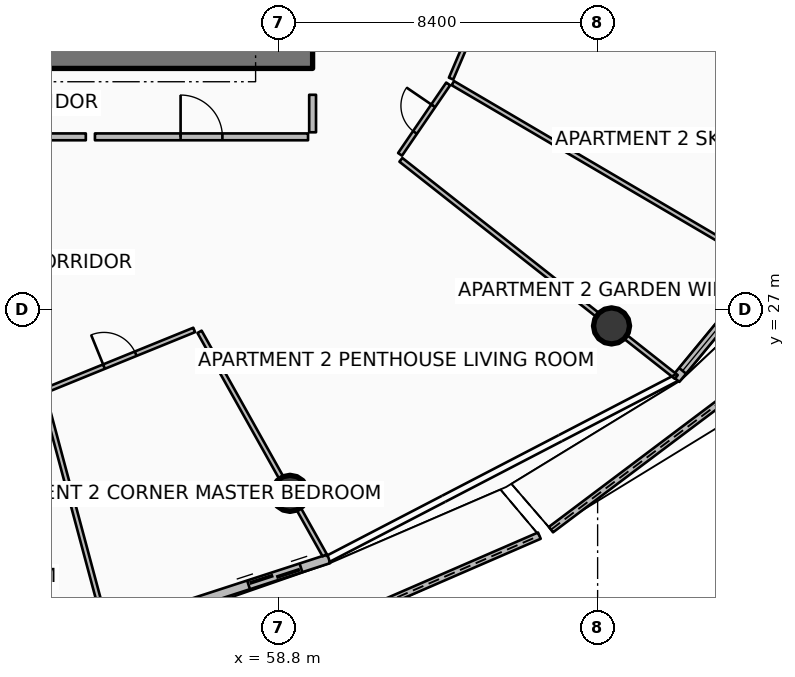
"""IFC4 building model, lengths in metres.
Left out: names, types, materials, properties, quantities, classifications, styles, units other than length and angle.
Written with IfcOpenShell. Run it as: python <this file> out.ifc"""

import sys

from ifc_helpers import new_model, si_unit, direction, frame, frame_2d, origin, origin_2d, place, context, subcontext, project, spatial, polyline, rectangle, circle, outline, extrude, element, fill, save


model = new_model("IFC4")
c1 = context("Model", 3, precision=1e-05, world=origin(), true_north=direction((0.0, 1.0)))
c2 = subcontext(c1, "Body", "Model", "MODEL_VIEW")
j1 = project(units=[si_unit("LENGTHUNIT", "METRE"), si_unit("PLANEANGLEUNIT", "RADIAN")], contexts=[c1])
p1 = place(None, origin())
s1 = spatial("IfcSite", under=j1, at=p1, CompositionType="ELEMENT")
p2 = place(p1, origin())
s2 = spatial("IfcBuilding", under=s1, at=p2, CompositionType="ELEMENT")
p3 = place(p2, frame((0.0, 0.0, 240.55)))
s3 = spatial("IfcBuildingStorey", under=s2, at=p3, CompositionType="ELEMENT", Elevation=240.55)
p4 = place(p3, frame((49.95, 33.675, 0.0), z_axis=(0.0, 0.0, 1.0), x_axis=(1.0, 0.0, 0.0)))
e1 = element("IfcWall", 1, at=p4, inside=s3, PredefinedType="SHEAR", context=c2, shape_type="SweptSolid", body=[
    extrude(rectangle(XDim=9.75, YDim=0.65, at=frame_2d((4.875, 0.0))), origin(), (0.0, 0.0, 1.0), 3.85),
])
for number, where, z_axis, x_axis in (
    (2, (59.105, 22.17, 0.0), (0.0, 0.0, 1.0), (1.0, 0.0, 0.0)),
    (3, (67.566, 26.575, 0.0), (0.0, 0.0, 1.0), (1.0, 0.0, 0.0)),
):
    element("IfcColumn", number, at=place(p3, frame(where, z_axis=z_axis, x_axis=x_axis)), inside=s3, PredefinedType="COLUMN", context=c2, shape_type="SweptSolid", body=[
        extrude(circle(Radius=0.475, at=origin_2d()), origin(), (0.0, 0.0, 1.0), 3.59),
    ])
p5 = place(p3, frame((56.257, 16.974, 0.0), z_axis=(0.0, 0.0, 1.0), x_axis=(0.917372888721, 0.398028872119, 0.0)))
e4 = element("IfcWall", 4, at=p5, inside=s3, PredefinedType="PARAPET", context=c2, shape_type="SweptSolid", body=[
    extrude(outline(polyline([(0.0, 0.0), (10.258, 0.0), (10.257, 1.12), (5.129, 1.182), (0.0, 1.348), (0.0, 0.0)])), frame((0.0, 0.09, 0.0), z_axis=(0.0, -1.0, 0.0), x_axis=(1.0, 0.0, 0.0)), (0.0, 0.0, 1.0), 0.18),
])
p6 = place(p3, frame((65.972, 21.216, 0.0), z_axis=(0.0, 0.0, 1.0), x_axis=(0.799146815098, 0.601135898046, 0.0)))
e5 = element("IfcWall", 5, at=p6, inside=s3, PredefinedType="PARAPET", context=c2, shape_type="SweptSolid", body=[
    extrude(outline(polyline([(0.0, 0.0), (11.411, 0.0), (11.411, 1.348), (5.706, 1.182), (0.0, 1.12), (0.0, 0.0)])), frame((0.0, 0.09, 0.0), z_axis=(0.0, -1.0, 0.0), x_axis=(1.0, 0.0, 0.0)), (0.0, 0.0, 1.0), 0.18),
])
p7 = place(p3, frame((50.858, 17.436, 0.0), z_axis=(0.0, 0.0, 1.0), x_axis=(0.951055974609, 0.309018661507, 0.0)))
e6 = element("IfcWall", 6, at=p7, inside=s3, PredefinedType="SOLIDWALL", context=c2, shape_type="SweptSolid", body=[
    extrude(rectangle(XDim=9.745, YDim=0.24, at=frame_2d((4.873, 0.0))), origin(), (0.0, 0.0, 1.0), 2.54),
])
p8 = place(p7, frame((7.525, 0.0, 0.0)))
e7 = element("IfcOpeningElement", 7, at=p8, cuts=e6, PredefinedType="OPENING", context=c2, shape_type="SweptSolid", body=[
    extrude(rectangle(XDim=1.45, YDim=2.15, at=frame_2d((0.725, 1.075))), frame((0.0, 0.13, 0.0), z_axis=(0.0, -1.0, 0.0), x_axis=(1.0, 0.0, 0.0)), (0.0, 0.0, 1.0), 0.26),
])
p9 = place(p7, frame((0.28, 0.0, 0.65)))
e8 = element("IfcOpeningElement", 8, at=p9, cuts=e6, PredefinedType="OPENING", context=c2, shape_type="SweptSolid", body=[
    extrude(rectangle(XDim=1.6, YDim=1.5, at=frame_2d((0.8, 0.75))), frame((0.0, 0.13, 0.0), z_axis=(0.0, -1.0, 0.0), x_axis=(1.0, 0.0, 0.0)), (0.0, 0.0, 1.0), 0.26),
])
p10 = place(p3, frame((69.258, 25.178, 0.0), z_axis=(0.0, 0.0, 1.0), x_axis=(0.636680093065, 0.771128043255, 0.0)))
e9 = element("IfcWall", 9, at=p10, inside=s3, PredefinedType="SOLIDWALL", context=c2, shape_type="SweptSolid", body=[
    extrude(rectangle(XDim=11.438, YDim=0.24, at=frame_2d((5.719, 0.0))), origin(), (0.0, 0.0, 1.0), 2.54),
])
p11 = place(p10, frame((9.218, 0.0, 0.0)))
e10 = element("IfcOpeningElement", 10, at=p11, cuts=e9, PredefinedType="OPENING", context=c2, shape_type="SweptSolid", body=[
    extrude(rectangle(XDim=1.45, YDim=2.15, at=frame_2d((0.725, 1.075))), frame((0.0, 0.13, 0.0), z_axis=(0.0, -1.0, 0.0), x_axis=(1.0, 0.0, 0.0)), (0.0, 0.0, 1.0), 0.26),
])
p12 = place(p10, frame((0.28, 0.0, 0.65)))
e11 = element("IfcOpeningElement", 11, at=p12, cuts=e9, PredefinedType="OPENING", context=c2, shape_type="SweptSolid", body=[
    extrude(rectangle(XDim=1.6, YDim=1.5, at=frame_2d((0.8, 0.75))), frame((0.0, 0.13, 0.0), z_axis=(0.0, -1.0, 0.0), x_axis=(1.0, 0.0, 0.0)), (0.0, 0.0, 1.0), 0.26),
])
p13 = place(p3, frame((53.972, 31.55, 0.0), z_axis=(0.0, 0.0, 1.0), x_axis=(1.0, 0.0, 0.0)))
e12 = element("IfcWall", 12, at=p13, inside=s3, PredefinedType="PARTITIONING", context=c2, shape_type="SweptSolid", body=[
    extrude(rectangle(XDim=5.608, YDim=0.18, at=frame_2d((2.804, 0.0))), origin(), (0.0, 0.0, 1.0), 2.957),
])
p14 = place(p13, frame((2.254, 0.0, 0.0)))
e13 = element("IfcOpeningElement", 13, at=p14, cuts=e12, PredefinedType="OPENING", context=c2, shape_type="SweptSolid", body=[
    extrude(rectangle(XDim=1.1, YDim=2.1, at=frame_2d((0.55, 1.05))), frame((0.0, 0.1, 0.0), z_axis=(0.0, -1.0, 0.0), x_axis=(1.0, 0.0, 0.0)), (0.0, 0.0, 1.0), 0.2),
])
p15 = place(p3, frame((59.7, 31.67, 0.0), z_axis=(0.0, 0.0, 1.0), x_axis=(0.0, 1.0, 0.0)))
e14 = element("IfcWall", 14, at=p15, inside=s3, PredefinedType="PARTITIONING", context=c2, shape_type="SweptSolid", body=[
    extrude(rectangle(XDim=0.987, YDim=0.18, at=frame_2d((0.493, 0.0))), origin(), (0.0, 0.0, 1.0), 2.957),
])
p16 = place(p3, frame((49.357, 31.55, 0.0), z_axis=(0.0, 0.0, 1.0), x_axis=(1.0, 0.0, 0.0)))
e15 = element("IfcWall", 15, at=p16, inside=s3, PredefinedType="PARTITIONING", context=c2, shape_type="SweptSolid", body=[
    extrude(rectangle(XDim=4.376, YDim=0.18, at=frame_2d((2.188, 0.0))), origin(), (0.0, 0.0, 1.0), 2.957),
])
p17 = place(p3, frame((56.725, 26.42, 0.0), z_axis=(0.0, 0.0, 1.0), x_axis=(0.488624332812, -0.872494275846, 0.0)))
e16 = element("IfcWall", 16, at=p17, inside=s3, PredefinedType="PARTITIONING", context=c2, shape_type="SweptSolid", body=[
    extrude(rectangle(XDim=6.738, YDim=0.125, at=frame_2d((3.369, 0.0))), origin(), (0.0, 0.0, 1.0), 2.957),
])
p18 = place(p3, frame((52.621, 24.762, 0.0), z_axis=(0.0, 0.0, 1.0), x_axis=(0.258970884365, -0.96588512829, 0.0)))
e17 = element("IfcWall", 17, at=p18, inside=s3, PredefinedType="PARTITIONING", context=c2, shape_type="SweptSolid", body=[
    extrude(rectangle(XDim=6.306, YDim=0.125, at=frame_2d((3.153, 0.0))), origin(), (0.0, 0.0, 1.0), 3.03),
])
p19 = place(p3, frame((52.672, 24.879, 0.0), z_axis=(0.0, 0.0, 1.0), x_axis=(0.926344303187, 0.376677888857, 0.0)))
e18 = element("IfcWall", 18, at=p19, inside=s3, PredefinedType="PARTITIONING", context=c2, shape_type="SweptSolid", body=[
    extrude(rectangle(XDim=4.223, YDim=0.125, at=frame_2d((2.111, 0.0))), origin(), (0.0, 0.0, 1.0), 2.957),
])
p20 = place(p19, frame((1.661, 0.0, 0.0)))
e19 = element("IfcOpeningElement", 19, at=p20, cuts=e18, PredefinedType="OPENING", context=c2, shape_type="SweptSolid", body=[
    extrude(rectangle(XDim=0.9, YDim=2.08, at=frame_2d((0.45, 1.04))), frame((0.0, 0.073, 0.0), z_axis=(0.0, -1.0, 0.0), x_axis=(1.0, 0.0, 0.0)), (0.0, 0.0, 1.0), 0.145),
])
p21 = place(p3, frame((62.023, 30.945, 0.0), z_axis=(0.0, 0.0, 1.0), x_axis=(0.785322102606, -0.619087388952, 0.0)))
e20 = element("IfcWall", 20, at=p21, inside=s3, PredefinedType="PARTITIONING", context=c2, shape_type="SweptSolid", body=[
    extrude(rectangle(XDim=9.228, YDim=0.125, at=frame_2d((4.614, 0.0))), origin(), (0.0, 0.0, 1.0), 2.957),
])
p22 = place(p3, frame((63.39, 32.963, 0.0), z_axis=(0.0, 0.0, 1.0), x_axis=(0.862331921897, -0.506343417532, 0.0)))
e21 = element("IfcWall", 21, at=p22, inside=s3, PredefinedType="PARTITIONING", context=c2, shape_type="SweptSolid", body=[
    extrude(rectangle(XDim=9.478, YDim=0.125, at=frame_2d((4.739, 0.0))), origin(), (0.0, 0.0, 1.0), 3.03),
])
p23 = place(p3, frame((62.001, 31.089, 0.0), z_axis=(0.0, 0.0, 1.0), x_axis=(0.564052095913, 0.825739204044, 0.0)))
e22 = element("IfcWall", 22, at=p23, inside=s3, PredefinedType="PARTITIONING", context=c2, shape_type="SweptSolid", body=[
    extrude(rectangle(XDim=2.245, YDim=0.125, at=frame_2d((1.122, 0.0))), origin(), (0.0, 0.0, 1.0), 2.957),
])
p24 = place(p23, frame((0.698, 0.0, 0.0)))
e23 = element("IfcOpeningElement", 23, at=p24, cuts=e22, PredefinedType="OPENING", context=c2, shape_type="SweptSolid", body=[
    extrude(rectangle(XDim=0.85, YDim=2.06, at=frame_2d((0.425, 1.03))), frame((0.0, 0.073, 0.0), z_axis=(0.0, -1.0, 0.0), x_axis=(1.0, 0.0, 0.0)), (0.0, 0.0, 1.0), 0.145),
])
p25 = place(p3, frame((63.344, 33.083, 0.0), z_axis=(0.0, 0.0, 1.0), x_axis=(0.392064212371, 0.919937852998, 0.0)))
e24 = element("IfcWall", 24, at=p25, inside=s3, PredefinedType="PARTITIONING", context=c2, shape_type="SweptSolid", body=[
    extrude(rectangle(XDim=4.354, YDim=0.125, at=frame_2d((2.177, 0.0))), origin(), (0.0, 0.0, 1.0), 2.957),
])
p26 = place(p25, frame((1.727, 0.0, 0.0)))
e25 = element("IfcOpeningElement", 25, at=p26, cuts=e24, PredefinedType="OPENING", context=c2, shape_type="SweptSolid", body=[
    extrude(rectangle(XDim=0.9, YDim=2.08, at=frame_2d((0.45, 1.04))), frame((0.0, 0.073, 0.0), z_axis=(0.0, -1.0, 0.0), x_axis=(1.0, 0.0, 0.0)), (0.0, 0.0, 1.0), 0.145),
])
p27 = place(p8, origin())
e26 = element("IfcDoor", 26, at=p27, inside=s3, OperationType="DOUBLE_DOOR_SLIDING", PredefinedType="DOOR", context=c2, shape_type="SweptSolid", body=[
    extrude(rectangle(XDim=1.45, YDim=2.15, at=frame_2d((0.725, 1.075))), frame((0.0, 0.025, 0.0), z_axis=(0.0, -1.0, 0.0), x_axis=(1.0, 0.0, 0.0)), (0.0, 0.0, 1.0), 0.05),
])
fill(e7, e26)
p28 = place(p12, origin())
e27 = element("IfcWindow", 27, at=p28, inside=s3, PartitioningType="SINGLE_PANEL", PredefinedType="WINDOW", context=c2, shape_type="SweptSolid", body=[
    extrude(rectangle(XDim=1.6, YDim=1.5, at=frame_2d((0.8, 0.75))), frame((0.0, 0.03, 0.0), z_axis=(0.0, -1.0, 0.0), x_axis=(1.0, 0.0, 0.0)), (0.0, 0.0, 1.0), 0.06),
])
fill(e11, e27)
p29 = place(p14, origin())
e28 = element("IfcDoor", 28, at=p29, inside=s3, OperationType="SINGLE_SWING_LEFT", PredefinedType="DOOR", context=c2, shape_type="SweptSolid", body=[
    extrude(rectangle(XDim=1.1, YDim=2.1, at=frame_2d((0.55, 1.05))), frame((0.0, 0.025, 0.0), z_axis=(0.0, -1.0, 0.0), x_axis=(1.0, 0.0, 0.0)), (0.0, 0.0, 1.0), 0.05),
])
fill(e13, e28)
p30 = place(p20, origin())
e29 = element("IfcDoor", 29, at=p30, inside=s3, OperationType="SINGLE_SWING_LEFT", PredefinedType="DOOR", context=c2, shape_type="SweptSolid", body=[
    extrude(rectangle(XDim=0.9, YDim=2.08, at=frame_2d((0.45, 1.04))), frame((0.0, 0.025, 0.0), z_axis=(0.0, -1.0, 0.0), x_axis=(1.0, 0.0, 0.0)), (0.0, 0.0, 1.0), 0.05),
])
fill(e19, e29)
p31 = place(p24, origin())
e30 = element("IfcDoor", 30, at=p31, inside=s3, OperationType="SINGLE_SWING_RIGHT", PredefinedType="DOOR", context=c2, shape_type="SweptSolid", body=[
    extrude(rectangle(XDim=0.85, YDim=2.06, at=frame_2d((0.425, 1.03))), frame((0.0, 0.025, 0.0), z_axis=(0.0, -1.0, 0.0), x_axis=(1.0, 0.0, 0.0)), (0.0, 0.0, 1.0), 0.05),
])
fill(e23, e30)
save(model, sys.argv[1])
